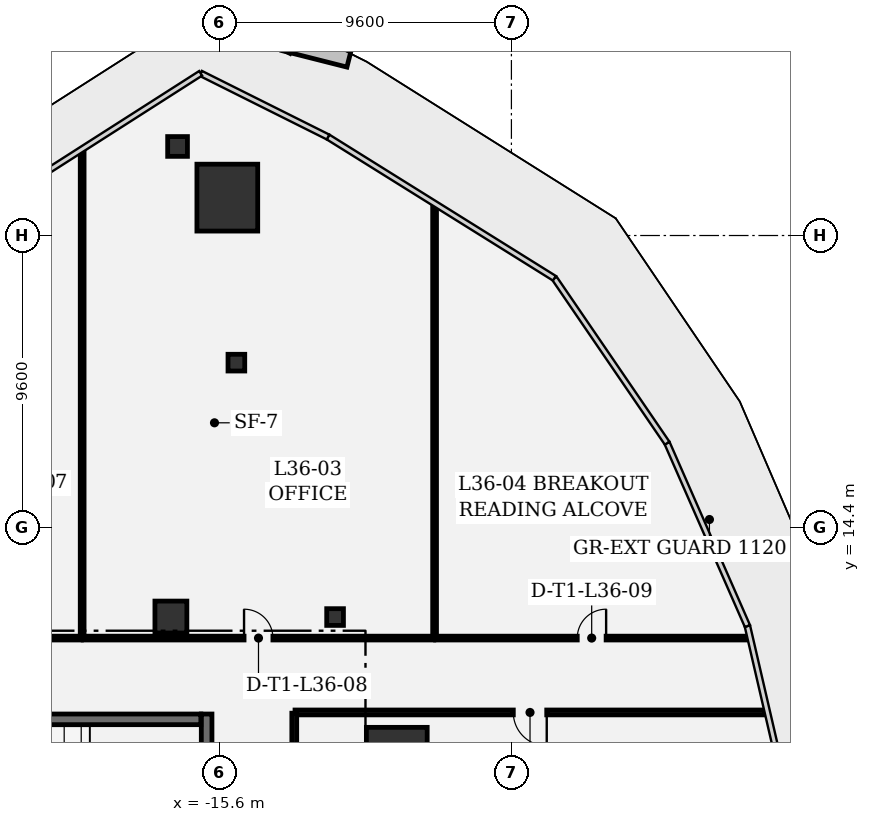
"""IFC4 building model, lengths in metres.
Left out: names, types, materials, properties, quantities, classifications, styles, units other than length and angle.
Written with IfcOpenShell. Run it as: python <this file> out.ifc"""

import sys

from ifc_helpers import new_model, si_unit, direction, frame, frame_2d, origin, origin_2d, place, context, subcontext, project, spatial, rectangle, extrude, element, fill, save


model = new_model("IFC4")
c1 = context("Model", 3, precision=1e-05, world=origin(), true_north=direction((0.0, 1.0)))
c2 = subcontext(c1, "Body", "Model", "MODEL_VIEW")
j1 = project(units=[si_unit("LENGTHUNIT", "METRE"), si_unit("PLANEANGLEUNIT", "RADIAN")], contexts=[c1])
p1 = place(None, origin())
s1 = spatial("IfcSite", under=j1, at=p1, CompositionType="ELEMENT")
p2 = place(p1, origin())
s2 = spatial("IfcBuilding", under=s1, at=p2, CompositionType="ELEMENT")
p3 = place(p2, frame((0.0, 0.0, 158.4)))
s3 = spatial("IfcBuildingStorey", under=s2, at=p3, CompositionType="ELEMENT", Elevation=158.4)
for number, where, z_axis, x_axis in (
    (1, (-9.77, 6.721, 0.0), (0.0, 0.0, 1.0), (1.0, 0.0, 0.0)),
    (2, (-15.344, 25.246, 0.0), (0.0, 0.0, 1.0), (1.0, 0.0, 0.0)),
):
    element("IfcColumn", number, at=place(p3, frame(where, z_axis=z_axis, x_axis=x_axis)), inside=s3, PredefinedType="COLUMN", context=c2, shape_type="SweptSolid", body=[
        extrude(rectangle(XDim=2.0, YDim=2.2, at=origin_2d()), origin(), (0.0, 0.0, 1.0), 4.05),
    ])
p4 = place(p3, frame((-17.2, 11.45, 0.0), z_axis=(0.0, 0.0, 1.0), x_axis=(1.0, 0.0, 0.0)))
e3 = element("IfcColumn", 3, at=p4, inside=s3, PredefinedType="COLUMN", context=c2, shape_type="SweptSolid", body=[
    extrude(rectangle(XDim=1.05, YDim=1.05, at=origin_2d()), origin(), (0.0, 0.0, 1.0), 4.05),
])
p5 = place(p3, frame((-16.981, 26.929, 0.0), z_axis=(0.0, 0.0, 1.0), x_axis=(1.0, 0.0, 0.0)))
e4 = element("IfcColumn", 4, at=p5, inside=s3, PredefinedType="COLUMN", context=c2, shape_type="SweptSolid", body=[
    extrude(rectangle(XDim=0.65, YDim=0.65, at=origin_2d()), origin(), (0.0, 0.0, 1.0), 4.05),
])
for number, where, z_axis, x_axis in (
    (5, (-15.046, 19.818, 0.0), (0.0, 0.0, 1.0), (1.0, 0.0, 0.0)),
    (6, (-11.8, 11.45, 0.0), (0.0, 0.0, 1.0), (1.0, 0.0, 0.0)),
):
    element("IfcColumn", number, at=place(p3, frame(where, z_axis=z_axis, x_axis=x_axis)), inside=s3, PredefinedType="COLUMN", context=c2, shape_type="SweptSolid", body=[
        extrude(rectangle(XDim=0.55, YDim=0.55, at=origin_2d()), origin(), (0.0, 0.0, 1.0), 4.05),
    ])
p6 = place(p3, frame((-16.025, 4.05, 0.0), z_axis=(0.0, 0.0, 1.0), x_axis=(0.0, 1.0, 0.0)))
e7 = element("IfcWall", 7, at=p6, inside=s3, PredefinedType="SHEAR", context=c2, shape_type="SweptSolid", body=[
    extrude(rectangle(XDim=4.21, YDim=0.35, at=frame_2d((2.105, 0.0))), origin(), (0.0, 0.0, 1.0), 3.78),
])
p7 = place(p3, frame((-16.215, 8.085, 0.0), z_axis=(0.0, 0.0, 1.0), x_axis=(-1.0, 0.0, 0.0)))
e8 = element("IfcWall", 8, at=p7, inside=s3, PredefinedType="SHEAR", context=c2, shape_type="SweptSolid", body=[
    extrude(rectangle(XDim=8.12, YDim=0.35, at=frame_2d((4.06, 0.0))), origin(), (0.0, 0.0, 1.0), 3.78),
])
p8 = place(p7, frame((6.74, 0.0, 0.0)))
e9 = element("IfcOpeningElement", 9, at=p8, cuts=e8, PredefinedType="OPENING", context=c2, shape_type="SweptSolid", body=[
    extrude(rectangle(XDim=1.1, YDim=2.2, at=frame_2d((0.55, 1.1))), frame((0.0, 0.185, 0.0), z_axis=(0.0, -1.0, 0.0), x_axis=(1.0, 0.0, 0.0)), (0.0, 0.0, 1.0), 0.37),
])
p9 = place(p3, frame((-25.767, 10.758, 0.0), z_axis=(0.0, 0.0, 1.0), x_axis=(1.0, 0.0, 0.0)))
e10 = element("IfcWall", 10, at=p9, inside=s3, PredefinedType="PARTITIONING", context=c2, shape_type="SweptSolid", body=[
    extrude(rectangle(XDim=5.623, YDim=0.125, at=frame_2d((2.812, 0.0))), origin(), (0.0, 0.0, 1.0), 3.78),
])
p10 = place(p3, frame((-20.119, 10.783, 0.0), z_axis=(0.0, 0.0, 1.0), x_axis=(0.0, 1.0, 0.0)))
e11 = element("IfcWall", 11, at=p10, inside=s3, PredefinedType="PARTITIONING", context=c2, shape_type="SweptSolid", body=[
    extrude(rectangle(XDim=15.981, YDim=0.125, at=frame_2d((7.99, 0.0))), origin(), (0.0, 0.0, 1.0), 2.895),
])
p11 = place(p3, frame((-20.086, 10.758, 0.0), z_axis=(0.0, 0.0, 1.0), x_axis=(1.0, 0.0, 0.0)))
e12 = element("IfcWall", 12, at=p11, inside=s3, PredefinedType="PARTITIONING", context=c2, shape_type="SweptSolid", body=[
    extrude(rectangle(XDim=11.534, YDim=0.125, at=frame_2d((5.767, 0.0))), origin(), (0.0, 0.0, 1.0), 2.895),
])
p12 = place(p11, frame((5.292, 0.0, 0.0)))
e13 = element("IfcOpeningElement", 13, at=p12, cuts=e12, PredefinedType="OPENING", context=c2, shape_type="SweptSolid", body=[
    extrude(rectangle(XDim=0.95, YDim=2.15, at=frame_2d((0.475, 1.075))), frame((0.0, 0.073, 0.0), z_axis=(0.0, -1.0, 0.0), x_axis=(1.0, 0.0, 0.0)), (0.0, 0.0, 1.0), 0.145),
])
p13 = place(p3, frame((-8.527, 10.783, 0.0), z_axis=(0.0, 0.0, 1.0), x_axis=(0.0, 1.0, 0.0)))
e14 = element("IfcWall", 14, at=p13, inside=s3, PredefinedType="PARTITIONING", context=c2, shape_type="SweptSolid", body=[
    extrude(rectangle(XDim=14.19, YDim=0.125, at=frame_2d((7.095, 0.0))), origin(), (0.0, 0.0, 1.0), 3.78),
])
p14 = place(p3, frame((-8.494, 10.758, 0.0), z_axis=(0.0, 0.0, 1.0), x_axis=(1.0, 0.0, 0.0)))
e15 = element("IfcWall", 15, at=p14, inside=s3, PredefinedType="PARTITIONING", context=c2, shape_type="SweptSolid", body=[
    extrude(rectangle(XDim=10.268, YDim=0.125, at=frame_2d((5.134, 0.0))), origin(), (0.0, 0.0, 1.0), 3.78),
])
p15 = place(p14, frame((4.659, 0.0, 0.0)))
e16 = element("IfcOpeningElement", 16, at=p15, cuts=e15, PredefinedType="OPENING", context=c2, shape_type="SweptSolid", body=[
    extrude(rectangle(XDim=0.95, YDim=2.15, at=frame_2d((0.475, 1.075))), frame((0.0, 0.073, 0.0), z_axis=(0.0, -1.0, 0.0), x_axis=(1.0, 0.0, 0.0)), (0.0, 0.0, 1.0), 0.145),
])
p16 = place(p3, frame((2.341, 8.312, 0.0), z_axis=(0.0, 0.0, 1.0), x_axis=(-1.0, 0.0, 0.0)))
e17 = element("IfcWall", 17, at=p16, inside=s3, PredefinedType="PARTITIONING", context=c2, shape_type="SweptSolid", body=[
    extrude(rectangle(XDim=15.458, YDim=0.16, at=frame_2d((7.729, 0.0))), origin(), (0.0, 0.0, 1.0), 2.895),
])
p17 = place(p16, frame((7.179, 0.0, 0.0)))
e18 = element("IfcOpeningElement", 18, at=p17, cuts=e17, PredefinedType="OPENING", context=c2, shape_type="SweptSolid", body=[
    extrude(rectangle(XDim=1.1, YDim=2.15, at=frame_2d((0.55, 1.075))), frame((0.0, 0.09, 0.0), z_axis=(0.0, -1.0, 0.0), x_axis=(1.0, 0.0, 0.0)), (0.0, 0.0, 1.0), 0.18),
])
p18 = place(p3, frame((-13.142, 8.287, 0.0), z_axis=(0.0, 0.0, 1.0), x_axis=(0.0, -1.0, 0.0)))
e19 = element("IfcWall", 19, at=p18, inside=s3, PredefinedType="PARTITIONING", context=c2, shape_type="SweptSolid", body=[
    extrude(rectangle(XDim=7.625, YDim=0.16, at=frame_2d((3.812, 0.0))), origin(), (0.0, 0.0, 1.0), 3.78),
])
p19 = place(p12, origin())
e20 = element("IfcDoor", 20, at=p19, inside=s3, OperationType="SINGLE_SWING_LEFT", PredefinedType="DOOR", context=c2, shape_type="SweptSolid", body=[
    extrude(rectangle(XDim=0.95, YDim=2.15, at=frame_2d((0.475, 1.075))), frame((0.0, 0.025, 0.0), z_axis=(0.0, -1.0, 0.0), x_axis=(1.0, 0.0, 0.0)), (0.0, 0.0, 1.0), 0.05),
])
fill(e13, e20)
p20 = place(p15, origin())
e21 = element("IfcDoor", 21, at=p20, inside=s3, OperationType="SINGLE_SWING_RIGHT", PredefinedType="DOOR", context=c2, shape_type="SweptSolid", body=[
    extrude(rectangle(XDim=0.95, YDim=2.15, at=frame_2d((0.475, 1.075))), frame((0.0, 0.025, 0.0), z_axis=(0.0, -1.0, 0.0), x_axis=(1.0, 0.0, 0.0)), (0.0, 0.0, 1.0), 0.05),
])
fill(e16, e21)
p21 = place(p17, origin())
e22 = element("IfcDoor", 22, at=p21, inside=s3, OperationType="SINGLE_SWING_LEFT", PredefinedType="DOOR", context=c2, shape_type="SweptSolid", body=[
    extrude(rectangle(XDim=1.1, YDim=2.15, at=frame_2d((0.55, 1.075))), frame((0.0, 0.025, 0.0), z_axis=(0.0, -1.0, 0.0), x_axis=(1.0, 0.0, 0.0)), (0.0, 0.0, 1.0), 0.05),
])
fill(e18, e22)
save(model, sys.argv[1])
